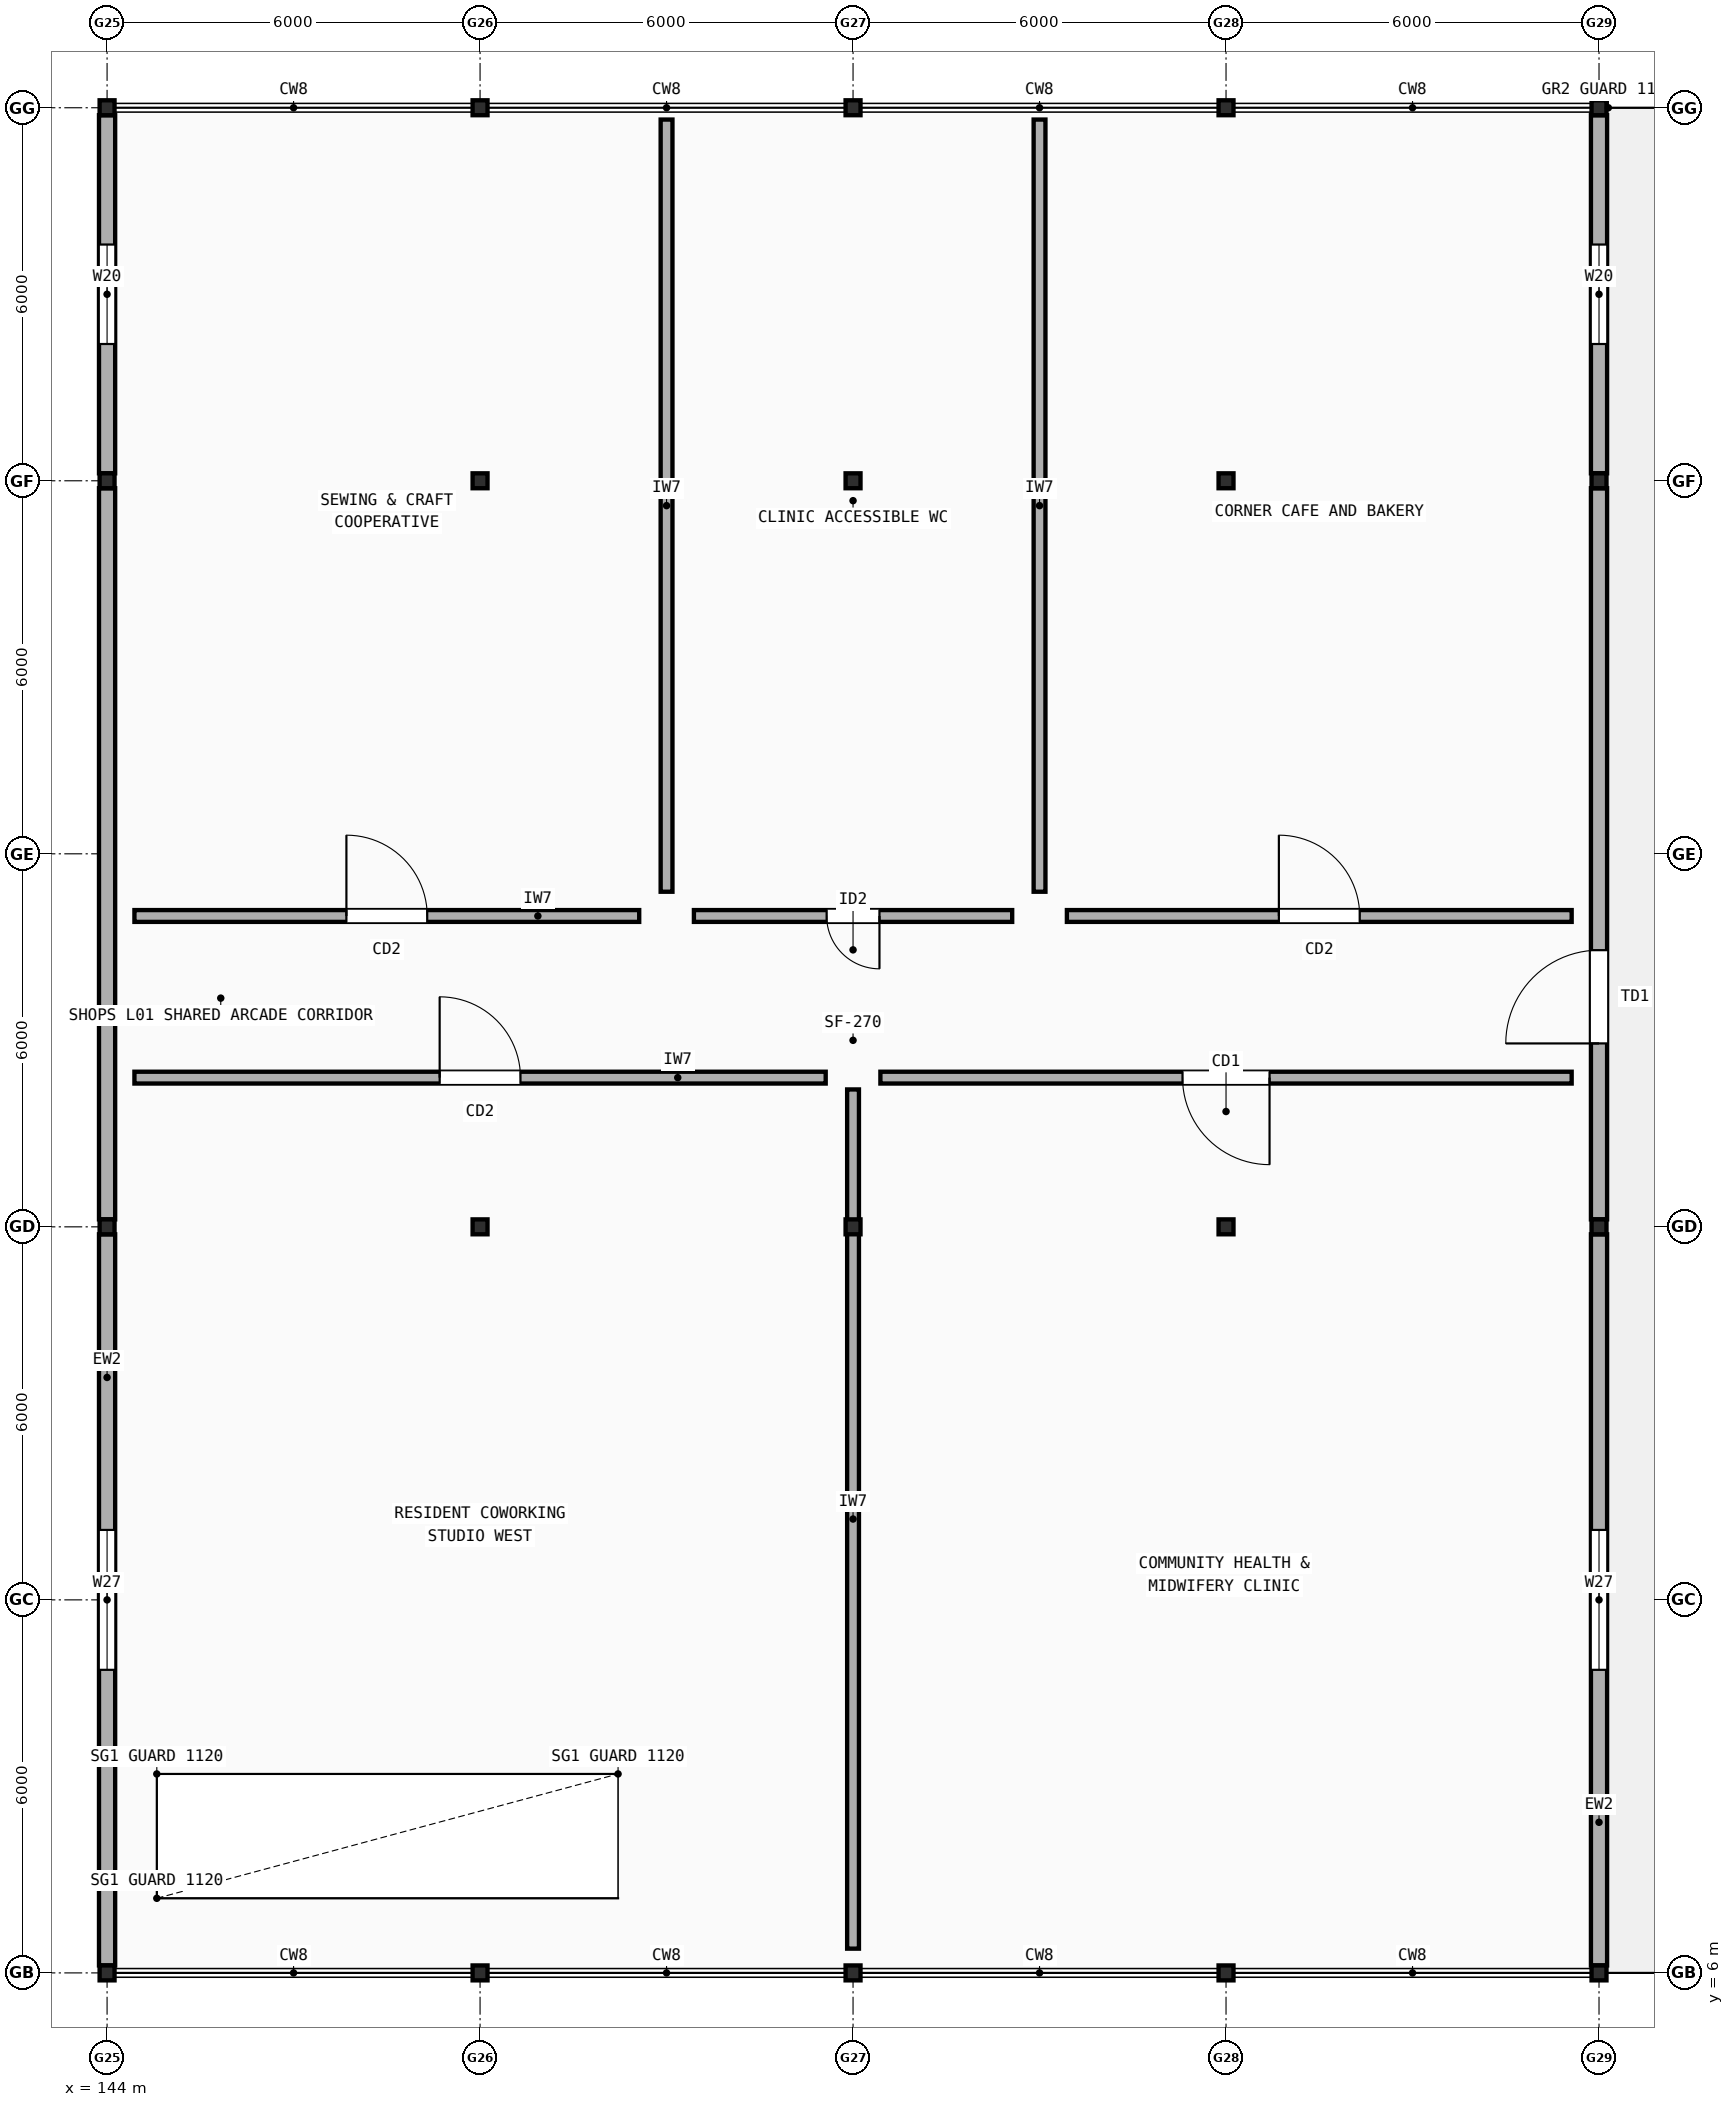
"""IFC4 building model, lengths in metres.
Left out: names, types, materials, properties, quantities, classifications, styles, units other than length and angle.
Written with IfcOpenShell. Run it as: python <this file> out.ifc"""

import sys

from ifc_helpers import new_model, si_unit, direction, frame, frame_2d, origin, origin_2d, place, context, subcontext, project, spatial, rectangle, i_section, extrude, element, fill, save


model = new_model("IFC4")
c1 = context("Model", 3, precision=1e-05, world=origin(), true_north=direction((0.0, 1.0)))
c2 = subcontext(c1, "Body", "Model", "MODEL_VIEW")
j1 = project(units=[si_unit("LENGTHUNIT", "METRE"), si_unit("PLANEANGLEUNIT", "RADIAN")], contexts=[c1])
p1 = place(None, origin())
s1 = spatial("IfcSite", under=j1, at=p1, CompositionType="ELEMENT")
p2 = place(p1, origin())
s2 = spatial("IfcBuilding", under=s1, at=p2, CompositionType="ELEMENT")
p3 = place(p2, frame((0.0, 0.0, 4.5)))
s3 = spatial("IfcBuildingStorey", under=s2, at=p3, CompositionType="ELEMENT", Elevation=4.5)
for number, where, z_axis, x_axis in (
    (1, (144.0, 6.0, 0.0), (0.0, 0.0, 1.0), (1.0, 0.0, 0.0)),
    (2, (144.0, 18.0, 0.0), (0.0, 0.0, 1.0), (1.0, 0.0, 0.0)),
    (3, (144.0, 30.0, 0.0), (0.0, 0.0, 1.0), (1.0, 0.0, 0.0)),
    (4, (144.0, 36.0, 0.0), (0.0, 0.0, 1.0), (1.0, 0.0, 0.0)),
):
    element("IfcColumn", number, at=place(p3, frame(where, z_axis=z_axis, x_axis=x_axis)), inside=s3, PredefinedType="COLUMN", context=c2, shape_type="SweptSolid", body=[
        extrude(i_section(OverallWidth=0.24, OverallDepth=0.24, WebThickness=0.01, FlangeThickness=0.017, FilletRadius=0.021, at=origin_2d()), origin(), (0.0, 0.0, 1.0), 3.16),
    ])
for number, where, z_axis, x_axis in (
    (5, (150.0, 6.0, 0.0), (0.0, 0.0, 1.0), (1.0, 0.0, 0.0)),
    (6, (150.0, 18.0, 0.0), (0.0, 0.0, 1.0), (1.0, 0.0, 0.0)),
    (7, (150.0, 30.0, 0.0), (0.0, 0.0, 1.0), (1.0, 0.0, 0.0)),
    (8, (150.0, 36.0, 0.0), (0.0, 0.0, 1.0), (1.0, 0.0, 0.0)),
):
    element("IfcColumn", number, at=place(p3, frame(where, z_axis=z_axis, x_axis=x_axis)), inside=s3, PredefinedType="COLUMN", context=c2, shape_type="SweptSolid", body=[
        extrude(i_section(OverallWidth=0.24, OverallDepth=0.24, WebThickness=0.01, FlangeThickness=0.017, FilletRadius=0.021, at=origin_2d()), origin(), (0.0, 0.0, 1.0), 4.435),
    ])
for number, where, z_axis, x_axis in (
    (9, (156.0, 6.0, 0.0), (0.0, 0.0, 1.0), (1.0, 0.0, 0.0)),
    (10, (156.0, 18.0, 0.0), (0.0, 0.0, 1.0), (1.0, 0.0, 0.0)),
    (11, (156.0, 30.0, 0.0), (0.0, 0.0, 1.0), (1.0, 0.0, 0.0)),
    (12, (156.0, 36.0, 0.0), (0.0, 0.0, 1.0), (1.0, 0.0, 0.0)),
):
    element("IfcColumn", number, at=place(p3, frame(where, z_axis=z_axis, x_axis=x_axis)), inside=s3, PredefinedType="COLUMN", context=c2, shape_type="SweptSolid", body=[
        extrude(i_section(OverallWidth=0.24, OverallDepth=0.24, WebThickness=0.01, FlangeThickness=0.017, FilletRadius=0.021, at=origin_2d()), origin(), (0.0, 0.0, 1.0), 3.16),
    ])
for number, where, z_axis, x_axis in (
    (13, (162.0, 6.0, 0.0), (0.0, 0.0, 1.0), (1.0, 0.0, 0.0)),
    (14, (162.0, 18.0, 0.0), (0.0, 0.0, 1.0), (1.0, 0.0, 0.0)),
    (15, (162.0, 30.0, 0.0), (0.0, 0.0, 1.0), (1.0, 0.0, 0.0)),
    (16, (162.0, 36.0, 0.0), (0.0, 0.0, 1.0), (1.0, 0.0, 0.0)),
):
    element("IfcColumn", number, at=place(p3, frame(where, z_axis=z_axis, x_axis=x_axis)), inside=s3, PredefinedType="COLUMN", context=c2, shape_type="SweptSolid", body=[
        extrude(i_section(OverallWidth=0.24, OverallDepth=0.24, WebThickness=0.01, FlangeThickness=0.017, FilletRadius=0.021, at=origin_2d()), origin(), (0.0, 0.0, 1.0), 4.435),
    ])
for number, where, z_axis, x_axis in (
    (17, (168.0, 6.0, 0.0), (0.0, 0.0, 1.0), (1.0, 0.0, 0.0)),
    (18, (168.0, 18.0, 0.0), (0.0, 0.0, 1.0), (1.0, 0.0, 0.0)),
    (19, (168.0, 30.0, 0.0), (0.0, 0.0, 1.0), (1.0, 0.0, 0.0)),
    (20, (168.0, 36.0, 0.0), (0.0, 0.0, 1.0), (1.0, 0.0, 0.0)),
):
    element("IfcColumn", number, at=place(p3, frame(where, z_axis=z_axis, x_axis=x_axis)), inside=s3, PredefinedType="COLUMN", context=c2, shape_type="SweptSolid", body=[
        extrude(i_section(OverallWidth=0.24, OverallDepth=0.24, WebThickness=0.01, FlangeThickness=0.017, FilletRadius=0.021, at=origin_2d()), origin(), (0.0, 0.0, 1.0), 3.16),
    ])
p4 = place(p3, frame((144.0, 17.88, 0.0), z_axis=(0.0, 0.0, 1.0), x_axis=(0.0, -1.0, 0.0)))
e21 = element("IfcWall", 21, at=p4, inside=s3, PredefinedType="STANDARD", context=c2, shape_type="SweptSolid", body=[
    extrude(rectangle(XDim=11.76, YDim=0.26, at=frame_2d((5.88, 0.0))), origin(), (0.0, 0.0, 1.0), 2.6),
])
p5 = place(p4, frame((4.755, 0.0, 0.85)))
e22 = element("IfcOpeningElement", 22, at=p5, cuts=e21, PredefinedType="OPENING", context=c2, shape_type="SweptSolid", body=[
    extrude(rectangle(XDim=2.25, YDim=1.58, at=frame_2d((1.125, 0.79))), frame((0.0, 0.14, 0.0), z_axis=(0.0, -1.0, 0.0), x_axis=(1.0, 0.0, 0.0)), (0.0, 0.0, 1.0), 0.28),
])
p6 = place(p3, frame((168.0, 6.12, 0.0), z_axis=(0.0, 0.0, 1.0), x_axis=(0.0, 1.0, 0.0)))
e23 = element("IfcWall", 23, at=p6, inside=s3, PredefinedType="STANDARD", context=c2, shape_type="SweptSolid", body=[
    extrude(rectangle(XDim=11.76, YDim=0.26, at=frame_2d((5.88, 0.0))), origin(), (0.0, 0.0, 1.0), 2.6),
])
p7 = place(p6, frame((4.755, 0.0, 0.85)))
e24 = element("IfcOpeningElement", 24, at=p7, cuts=e23, PredefinedType="OPENING", context=c2, shape_type="SweptSolid", body=[
    extrude(rectangle(XDim=2.25, YDim=1.58, at=frame_2d((1.125, 0.79))), frame((0.0, 0.14, 0.0), z_axis=(0.0, -1.0, 0.0), x_axis=(1.0, 0.0, 0.0)), (0.0, 0.0, 1.0), 0.28),
])
p8 = place(p3, frame((144.0, 29.88, 0.0), z_axis=(0.0, 0.0, 1.0), x_axis=(0.0, -1.0, 0.0)))
e25 = element("IfcWall", 25, at=p8, inside=s3, PredefinedType="STANDARD", context=c2, shape_type="SweptSolid", body=[
    extrude(rectangle(XDim=11.76, YDim=0.26, at=frame_2d((5.88, 0.0))), origin(), (0.0, 0.0, 1.0), 2.6),
])
p9 = place(p3, frame((168.0, 18.12, 0.0), z_axis=(0.0, 0.0, 1.0), x_axis=(0.0, 1.0, 0.0)))
e26 = element("IfcWall", 26, at=p9, inside=s3, PredefinedType="STANDARD", context=c2, shape_type="SweptSolid", body=[
    extrude(rectangle(XDim=11.76, YDim=0.26, at=frame_2d((5.88, 0.0))), origin(), (0.0, 0.0, 1.0), 2.6),
])
p10 = place(p9, frame((2.83, 0.0, 0.0)))
e27 = element("IfcOpeningElement", 27, at=p10, cuts=e26, PredefinedType="OPENING", context=c2, shape_type="SweptSolid", body=[
    extrude(rectangle(XDim=1.5, YDim=2.15, at=frame_2d((0.75, 1.075))), frame((0.0, 0.14, 0.0), z_axis=(0.0, -1.0, 0.0), x_axis=(1.0, 0.0, 0.0)), (0.0, 0.0, 1.0), 0.28),
])
p11 = place(p3, frame((144.0, 35.88, 0.0), z_axis=(0.0, 0.0, 1.0), x_axis=(0.0, -1.0, 0.0)))
e28 = element("IfcWall", 28, at=p11, inside=s3, PredefinedType="STANDARD", context=c2, shape_type="SweptSolid", body=[
    extrude(rectangle(XDim=5.76, YDim=0.26, at=frame_2d((2.88, 0.0))), origin(), (0.0, 0.0, 1.0), 2.6),
])
p12 = place(p11, frame((2.08, 0.0, 0.85)))
e29 = element("IfcOpeningElement", 29, at=p12, cuts=e28, PredefinedType="OPENING", context=c2, shape_type="SweptSolid", body=[
    extrude(rectangle(XDim=1.6, YDim=1.5, at=frame_2d((0.8, 0.75))), frame((0.0, 0.14, 0.0), z_axis=(0.0, -1.0, 0.0), x_axis=(1.0, 0.0, 0.0)), (0.0, 0.0, 1.0), 0.28),
])
p13 = place(p3, frame((168.0, 30.12, 0.0), z_axis=(0.0, 0.0, 1.0), x_axis=(0.0, 1.0, 0.0)))
e30 = element("IfcWall", 30, at=p13, inside=s3, PredefinedType="STANDARD", context=c2, shape_type="SweptSolid", body=[
    extrude(rectangle(XDim=5.76, YDim=0.26, at=frame_2d((2.88, 0.0))), origin(), (0.0, 0.0, 1.0), 2.6),
])
p14 = place(p13, frame((2.08, 0.0, 0.85)))
e31 = element("IfcOpeningElement", 31, at=p14, cuts=e30, PredefinedType="OPENING", context=c2, shape_type="SweptSolid", body=[
    extrude(rectangle(XDim=1.6, YDim=1.5, at=frame_2d((0.8, 0.75))), frame((0.0, 0.14, 0.0), z_axis=(0.0, -1.0, 0.0), x_axis=(1.0, 0.0, 0.0)), (0.0, 0.0, 1.0), 0.28),
])
p15 = place(p3, frame((144.44, 20.4, 0.0), z_axis=(0.0, 0.0, 1.0), x_axis=(1.0, 0.0, 0.0)))
e32 = element("IfcWall", 32, at=p15, inside=s3, PredefinedType="SOLIDWALL", context=c2, shape_type="SweptSolid", body=[
    extrude(rectangle(XDim=11.12, YDim=0.19, at=frame_2d((5.56, 0.0))), origin(), (0.0, 0.0, 1.0), 2.945),
])
p16 = place(p15, frame((4.91, 0.0, 0.0)))
e33 = element("IfcOpeningElement", 33, at=p16, cuts=e32, PredefinedType="OPENING", context=c2, shape_type="SweptSolid", body=[
    extrude(rectangle(XDim=1.3, YDim=2.15, at=frame_2d((0.65, 1.075))), frame((0.0, 0.105, 0.0), z_axis=(0.0, -1.0, 0.0), x_axis=(1.0, 0.0, 0.0)), (0.0, 0.0, 1.0), 0.21),
])
p17 = place(p3, frame((156.0, 6.39, 0.0), z_axis=(0.0, 0.0, 1.0), x_axis=(0.0, 1.0, 0.0)))
e34 = element("IfcWall", 34, at=p17, inside=s3, PredefinedType="SOLIDWALL", context=c2, shape_type="SweptSolid", body=[
    extrude(rectangle(XDim=13.82, YDim=0.19, at=frame_2d((6.91, 0.0))), origin(), (0.0, 0.0, 1.0), 2.945),
])
p18 = place(p3, frame((156.44, 20.4, 0.0), z_axis=(0.0, 0.0, 1.0), x_axis=(1.0, 0.0, 0.0)))
e35 = element("IfcWall", 35, at=p18, inside=s3, PredefinedType="SOLIDWALL", context=c2, shape_type="SweptSolid", body=[
    extrude(rectangle(XDim=11.12, YDim=0.19, at=frame_2d((5.56, 0.0))), origin(), (0.0, 0.0, 1.0), 2.945),
])
p19 = place(p18, frame((4.86, 0.0, 0.0)))
e36 = element("IfcOpeningElement", 36, at=p19, cuts=e35, PredefinedType="OPENING", context=c2, shape_type="SweptSolid", body=[
    extrude(rectangle(XDim=1.4, YDim=2.15, at=frame_2d((0.7, 1.075))), frame((0.0, 0.105, 0.0), z_axis=(0.0, -1.0, 0.0), x_axis=(1.0, 0.0, 0.0)), (0.0, 0.0, 1.0), 0.21),
])
p20 = place(p3, frame((144.44, 23.0, 0.0), z_axis=(0.0, 0.0, 1.0), x_axis=(1.0, 0.0, 0.0)))
e37 = element("IfcWall", 37, at=p20, inside=s3, PredefinedType="SOLIDWALL", context=c2, shape_type="SweptSolid", body=[
    extrude(rectangle(XDim=8.12, YDim=0.19, at=frame_2d((4.06, 0.0))), origin(), (0.0, 0.0, 1.0), 2.945),
])
p21 = place(p20, frame((3.41, 0.0, 0.0)))
e38 = element("IfcOpeningElement", 38, at=p21, cuts=e37, PredefinedType="OPENING", context=c2, shape_type="SweptSolid", body=[
    extrude(rectangle(XDim=1.3, YDim=2.15, at=frame_2d((0.65, 1.075))), frame((0.0, 0.105, 0.0), z_axis=(0.0, -1.0, 0.0), x_axis=(1.0, 0.0, 0.0)), (0.0, 0.0, 1.0), 0.21),
])
p22 = place(p3, frame((153.0, 23.39, 0.0), z_axis=(0.0, 0.0, 1.0), x_axis=(0.0, 1.0, 0.0)))
e39 = element("IfcWall", 39, at=p22, inside=s3, PredefinedType="SOLIDWALL", context=c2, shape_type="SweptSolid", body=[
    extrude(rectangle(XDim=12.42, YDim=0.19, at=frame_2d((6.21, 0.0))), origin(), (0.0, 0.0, 1.0), 2.945),
])
p23 = place(p3, frame((153.44, 23.0, 0.0), z_axis=(0.0, 0.0, 1.0), x_axis=(1.0, 0.0, 0.0)))
e40 = element("IfcWall", 40, at=p23, inside=s3, PredefinedType="SOLIDWALL", context=c2, shape_type="SweptSolid", body=[
    extrude(rectangle(XDim=5.12, YDim=0.19, at=frame_2d((2.56, 0.0))), origin(), (0.0, 0.0, 1.0), 2.945),
])
p24 = place(p23, frame((2.135, 0.0, 0.0)))
e41 = element("IfcOpeningElement", 41, at=p24, cuts=e40, PredefinedType="OPENING", context=c2, shape_type="SweptSolid", body=[
    extrude(rectangle(XDim=0.85, YDim=2.1, at=frame_2d((0.425, 1.05))), frame((0.0, 0.105, 0.0), z_axis=(0.0, -1.0, 0.0), x_axis=(1.0, 0.0, 0.0)), (0.0, 0.0, 1.0), 0.21),
])
p25 = place(p3, frame((159.0, 23.39, 0.0), z_axis=(0.0, 0.0, 1.0), x_axis=(0.0, 1.0, 0.0)))
e42 = element("IfcWall", 42, at=p25, inside=s3, PredefinedType="SOLIDWALL", context=c2, shape_type="SweptSolid", body=[
    extrude(rectangle(XDim=12.42, YDim=0.19, at=frame_2d((6.21, 0.0))), origin(), (0.0, 0.0, 1.0), 2.945),
])
p26 = place(p3, frame((159.44, 23.0, 0.0), z_axis=(0.0, 0.0, 1.0), x_axis=(1.0, 0.0, 0.0)))
e43 = element("IfcWall", 43, at=p26, inside=s3, PredefinedType="SOLIDWALL", context=c2, shape_type="SweptSolid", body=[
    extrude(rectangle(XDim=8.12, YDim=0.19, at=frame_2d((4.06, 0.0))), origin(), (0.0, 0.0, 1.0), 2.945),
])
p27 = place(p26, frame((3.41, 0.0, 0.0)))
e44 = element("IfcOpeningElement", 44, at=p27, cuts=e43, PredefinedType="OPENING", context=c2, shape_type="SweptSolid", body=[
    extrude(rectangle(XDim=1.3, YDim=2.15, at=frame_2d((0.65, 1.075))), frame((0.0, 0.105, 0.0), z_axis=(0.0, -1.0, 0.0), x_axis=(1.0, 0.0, 0.0)), (0.0, 0.0, 1.0), 0.21),
])
p28 = place(p5, origin())
e45 = element("IfcWindow", 45, at=p28, inside=s3, PartitioningType="SINGLE_PANEL", PredefinedType="WINDOW", context=c2, shape_type="SweptSolid", body=[
    extrude(rectangle(XDim=2.25, YDim=1.58, at=frame_2d((1.125, 0.79))), frame((0.0, 0.03, 0.0), z_axis=(0.0, -1.0, 0.0), x_axis=(1.0, 0.0, 0.0)), (0.0, 0.0, 1.0), 0.06),
])
fill(e22, e45)
p29 = place(p7, origin())
e46 = element("IfcWindow", 46, at=p29, inside=s3, PartitioningType="SINGLE_PANEL", PredefinedType="WINDOW", context=c2, shape_type="SweptSolid", body=[
    extrude(rectangle(XDim=2.25, YDim=1.58, at=frame_2d((1.125, 0.79))), frame((0.0, 0.03, 0.0), z_axis=(0.0, -1.0, 0.0), x_axis=(1.0, 0.0, 0.0)), (0.0, 0.0, 1.0), 0.06),
])
fill(e24, e46)
p30 = place(p10, frame((1.5, 0.0, 0.0), z_axis=(0.0, 0.0, 1.0), x_axis=(-1.0, 0.0, 0.0)))
e47 = element("IfcDoor", 47, at=p30, inside=s3, OperationType="SINGLE_SWING_LEFT", PredefinedType="DOOR", context=c2, shape_type="SweptSolid", body=[
    extrude(rectangle(XDim=1.5, YDim=2.15, at=frame_2d((0.75, 1.075))), frame((0.0, 0.025, 0.0), z_axis=(0.0, -1.0, 0.0), x_axis=(1.0, 0.0, 0.0)), (0.0, 0.0, 1.0), 0.05),
])
fill(e27, e47)
p31 = place(p12, origin())
e48 = element("IfcWindow", 48, at=p31, inside=s3, PartitioningType="SINGLE_PANEL", PredefinedType="WINDOW", context=c2, shape_type="SweptSolid", body=[
    extrude(rectangle(XDim=1.6, YDim=1.5, at=frame_2d((0.8, 0.75))), frame((0.0, 0.03, 0.0), z_axis=(0.0, -1.0, 0.0), x_axis=(1.0, 0.0, 0.0)), (0.0, 0.0, 1.0), 0.06),
])
fill(e29, e48)
p32 = place(p14, origin())
e49 = element("IfcWindow", 49, at=p32, inside=s3, PartitioningType="SINGLE_PANEL", PredefinedType="WINDOW", context=c2, shape_type="SweptSolid", body=[
    extrude(rectangle(XDim=1.6, YDim=1.5, at=frame_2d((0.8, 0.75))), frame((0.0, 0.03, 0.0), z_axis=(0.0, -1.0, 0.0), x_axis=(1.0, 0.0, 0.0)), (0.0, 0.0, 1.0), 0.06),
])
fill(e31, e49)
p33 = place(p16, origin())
e50 = element("IfcDoor", 50, at=p33, inside=s3, OperationType="SINGLE_SWING_LEFT", PredefinedType="DOOR", context=c2, shape_type="SweptSolid", body=[
    extrude(rectangle(XDim=1.3, YDim=2.15, at=frame_2d((0.65, 1.075))), frame((0.0, 0.025, 0.0), z_axis=(0.0, -1.0, 0.0), x_axis=(1.0, 0.0, 0.0)), (0.0, 0.0, 1.0), 0.05),
])
fill(e33, e50)
p34 = place(p19, origin())
e51 = element("IfcDoor", 51, at=p34, inside=s3, OperationType="SINGLE_SWING_RIGHT", PredefinedType="DOOR", context=c2, shape_type="SweptSolid", body=[
    extrude(rectangle(XDim=1.4, YDim=2.15, at=frame_2d((0.7, 1.075))), frame((0.0, 0.025, 0.0), z_axis=(0.0, -1.0, 0.0), x_axis=(1.0, 0.0, 0.0)), (0.0, 0.0, 1.0), 0.05),
])
fill(e36, e51)
p35 = place(p21, origin())
e52 = element("IfcDoor", 52, at=p35, inside=s3, OperationType="SINGLE_SWING_LEFT", PredefinedType="DOOR", context=c2, shape_type="SweptSolid", body=[
    extrude(rectangle(XDim=1.3, YDim=2.15, at=frame_2d((0.65, 1.075))), frame((0.0, 0.025, 0.0), z_axis=(0.0, -1.0, 0.0), x_axis=(1.0, 0.0, 0.0)), (0.0, 0.0, 1.0), 0.05),
])
fill(e38, e52)
p36 = place(p24, origin())
e53 = element("IfcDoor", 53, at=p36, inside=s3, OperationType="SINGLE_SWING_RIGHT", PredefinedType="DOOR", context=c2, shape_type="SweptSolid", body=[
    extrude(rectangle(XDim=0.85, YDim=2.1, at=frame_2d((0.425, 1.05))), frame((0.0, 0.025, 0.0), z_axis=(0.0, -1.0, 0.0), x_axis=(1.0, 0.0, 0.0)), (0.0, 0.0, 1.0), 0.05),
])
fill(e41, e53)
p37 = place(p27, origin())
e54 = element("IfcDoor", 54, at=p37, inside=s3, OperationType="SINGLE_SWING_LEFT", PredefinedType="DOOR", context=c2, shape_type="SweptSolid", body=[
    extrude(rectangle(XDim=1.3, YDim=2.15, at=frame_2d((0.65, 1.075))), frame((0.0, 0.025, 0.0), z_axis=(0.0, -1.0, 0.0), x_axis=(1.0, 0.0, 0.0)), (0.0, 0.0, 1.0), 0.05),
])
fill(e44, e54)
save(model, sys.argv[1])
